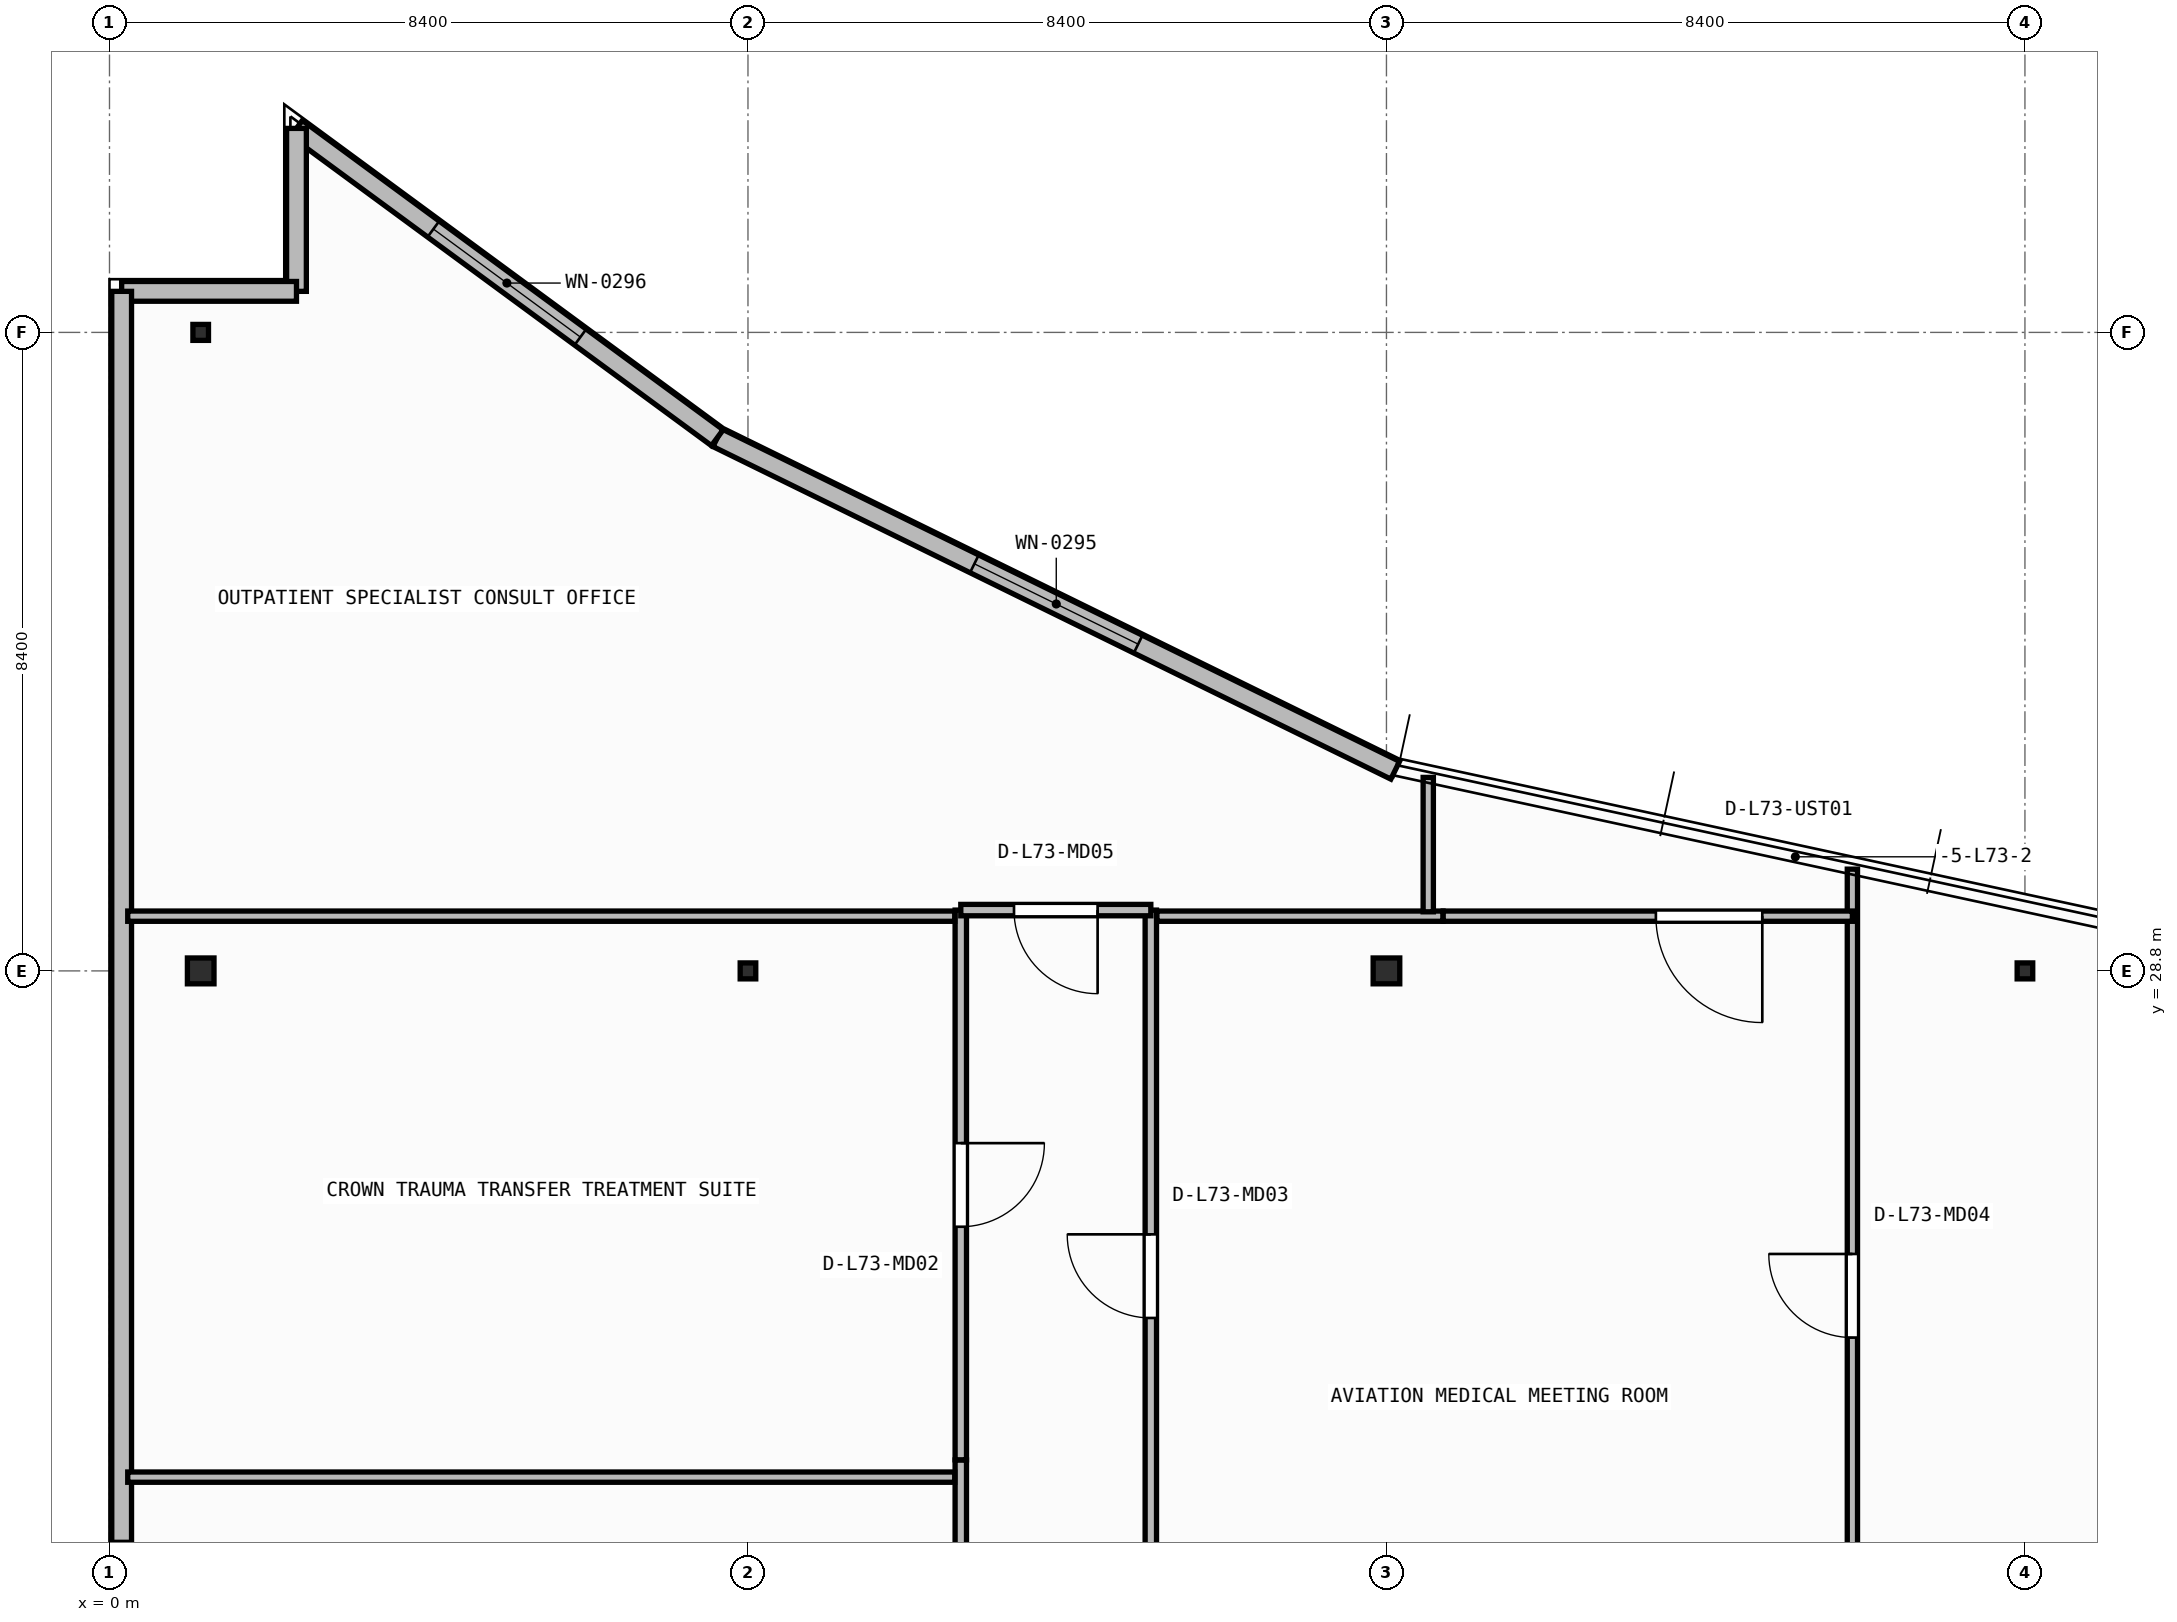
"""IFC4 building model, lengths in metres.
Left out: names, types, materials, properties, quantities, classifications, styles, units other than length and angle.
Written with IfcOpenShell. Run it as: python <this file> out.ifc"""

import sys

from ifc_helpers import new_model, si_unit, direction, frame, frame_2d, origin, origin_2d, place, context, subcontext, project, spatial, rectangle, i_section, extrude, element, fill, save


model = new_model("IFC4")
c1 = context("Model", 3, precision=1e-05, world=origin(), true_north=direction((0.0, 1.0)))
c2 = subcontext(c1, "Body", "Model", "MODEL_VIEW")
j1 = project(units=[si_unit("LENGTHUNIT", "METRE"), si_unit("PLANEANGLEUNIT", "RADIAN")], contexts=[c1])
p1 = place(None, origin())
s1 = spatial("IfcSite", under=j1, at=p1, CompositionType="ELEMENT")
p2 = place(p1, origin())
s2 = spatial("IfcBuilding", under=s1, at=p2, CompositionType="ELEMENT")
p3 = place(p2, frame((0.0, 0.0, 296.05)))
s3 = spatial("IfcBuildingStorey", under=s2, at=p3, CompositionType="ELEMENT", Elevation=296.05)
p4 = place(p3, frame((1.2, 28.8, 0.0), z_axis=(0.0, 0.0, 1.0), x_axis=(1.0, 0.0, 0.0)))
e1 = element("IfcColumn", 1, at=p4, inside=s3, PredefinedType="COLUMN", context=c2, shape_type="SweptSolid", body=[
    extrude(i_section(OverallWidth=0.35, OverallDepth=0.34, WebThickness=0.016, FlangeThickness=0.028, at=origin_2d()), origin(), (0.0, 0.0, 1.0), 3.95),
])
p5 = place(p3, frame((8.4, 28.8, 0.0), z_axis=(0.0, 0.0, 1.0), x_axis=(1.0, 0.0, 0.0)))
e2 = element("IfcColumn", 2, at=p5, inside=s3, PredefinedType="COLUMN", context=c2, shape_type="SweptSolid", body=[
    extrude(i_section(OverallWidth=0.205, OverallDepth=0.21, WebThickness=0.009, FlangeThickness=0.014, FilletRadius=0.011, at=origin_2d()), origin(), (0.0, 0.0, 1.0), 3.95),
])
p6 = place(p3, frame((16.8, 28.8, 0.0), z_axis=(0.0, 0.0, 1.0), x_axis=(1.0, 0.0, 0.0)))
e3 = element("IfcColumn", 3, at=p6, inside=s3, PredefinedType="COLUMN", context=c2, shape_type="SweptSolid", body=[
    extrude(i_section(OverallWidth=0.35, OverallDepth=0.34, WebThickness=0.016, FlangeThickness=0.028, at=origin_2d()), origin(), (0.0, 0.0, 1.0), 3.95),
])
for number, where, z_axis, x_axis in (
    (4, (25.2, 28.8, 0.0), (0.0, 0.0, 1.0), (1.0, 0.0, 0.0)),
    (5, (1.2, 37.2, 0.0), (0.0, 0.0, 1.0), (1.0, 0.0, 0.0)),
):
    element("IfcColumn", number, at=place(p3, frame(where, z_axis=z_axis, x_axis=x_axis)), inside=s3, PredefinedType="COLUMN", context=c2, shape_type="SweptSolid", body=[
        extrude(i_section(OverallWidth=0.205, OverallDepth=0.21, WebThickness=0.009, FlangeThickness=0.014, FilletRadius=0.011, at=origin_2d()), origin(), (0.0, 0.0, 1.0), 3.95),
    ])
p7 = place(p3, frame((16.915, 31.44, 0.0), z_axis=(0.0, 0.0, 1.0), x_axis=(-0.897793077248, 0.440417518322, 0.0)))
e6 = element("IfcWall", 6, at=p7, inside=s3, PredefinedType="STANDARD", context=c2, shape_type="SweptSolid", body=[
    extrude(rectangle(XDim=9.934, YDim=0.26, at=frame_2d((4.967, 0.0))), origin(), (0.0, 0.0, 1.0), 3.71),
])
p8 = place(p7, frame((3.767, 0.0, 0.9)))
e7 = element("IfcOpeningElement", 7, at=p8, cuts=e6, PredefinedType="OPENING", context=c2, shape_type="SweptSolid", body=[
    extrude(rectangle(XDim=2.4, YDim=1.65, at=frame_2d((1.2, 0.825))), frame((0.0, 0.14, 0.0), z_axis=(0.0, -1.0, 0.0), x_axis=(1.0, 0.0, 0.0)), (0.0, 0.0, 1.0), 0.28),
])
p9 = place(p3, frame((7.997, 35.815, 0.0), z_axis=(0.0, 0.0, 1.0), x_axis=(-0.805786654178, 0.592205933733, 0.0)))
e8 = element("IfcWall", 8, at=p9, inside=s3, PredefinedType="STANDARD", context=c2, shape_type="SweptSolid", body=[
    extrude(rectangle(XDim=6.871, YDim=0.26, at=frame_2d((3.436, 0.0))), origin(), (0.0, 0.0, 1.0), 3.71),
])
p10 = place(p9, frame((2.236, 0.0, 0.9)))
e9 = element("IfcOpeningElement", 9, at=p10, cuts=e8, PredefinedType="OPENING", context=c2, shape_type="SweptSolid", body=[
    extrude(rectangle(XDim=2.4, YDim=1.65, at=frame_2d((1.2, 0.825))), frame((0.0, 0.14, 0.0), z_axis=(0.0, -1.0, 0.0), x_axis=(1.0, 0.0, 0.0)), (0.0, 0.0, 1.0), 0.28),
])
p11 = place(p3, frame((2.46, 39.884, 0.0), z_axis=(0.0, 0.0, 1.0), x_axis=(0.0, -1.0, 0.0)))
e10 = element("IfcWall", 10, at=p11, inside=s3, PredefinedType="STANDARD", context=c2, shape_type="SweptSolid", body=[
    extrude(rectangle(XDim=2.144, YDim=0.26, at=frame_2d((1.072, 0.0))), origin(), (0.0, 0.0, 1.0), 3.71),
])
p12 = place(p3, frame((2.46, 37.74, 0.0), z_axis=(0.0, 0.0, 1.0), x_axis=(-1.0, 0.0, 0.0)))
e11 = element("IfcWall", 11, at=p12, inside=s3, PredefinedType="STANDARD", context=c2, shape_type="SweptSolid", body=[
    extrude(rectangle(XDim=2.3, YDim=0.26, at=frame_2d((1.15, 0.0))), origin(), (0.0, 0.0, 1.0), 3.71),
])
p13 = place(p3, frame((0.16, 37.74, 0.0), z_axis=(0.0, 0.0, 1.0), x_axis=(0.0, -1.0, 0.0)))
e12 = element("IfcWall", 12, at=p13, inside=s3, PredefinedType="STANDARD", context=c2, shape_type="SweptSolid", body=[
    extrude(rectangle(XDim=35.28, YDim=0.26, at=frame_2d((17.64, 0.0))), origin(), (0.0, 0.0, 1.0), 3.71),
])
p14 = place(p13, frame((16.44, 0.0, 0.9)))
e13 = element("IfcOpeningElement", 13, at=p14, cuts=e12, PredefinedType="OPENING", context=c2, shape_type="SweptSolid", body=[
    extrude(rectangle(XDim=2.4, YDim=1.65, at=frame_2d((1.2, 0.825))), frame((0.0, 0.14, 0.0), z_axis=(0.0, -1.0, 0.0), x_axis=(1.0, 0.0, 0.0)), (0.0, 0.0, 1.0), 0.28),
])
p15 = place(p3, frame((11.2, 22.366, 0.0), z_axis=(0.0, 0.0, 1.0), x_axis=(0.0, -1.0, 0.0)))
e14 = element("IfcWall", 14, at=p15, inside=s3, PredefinedType="PARTITIONING", context=c2, shape_type="SweptSolid", body=[
    extrude(rectangle(XDim=7.666, YDim=0.15, at=frame_2d((3.833, 0.0))), origin(), (0.0, 0.0, 1.0), 3.71),
])
p16 = place(p3, frame((11.2, 29.6, 0.0), z_axis=(0.0, 0.0, 1.0), x_axis=(0.0, -1.0, 0.0)))
e15 = element("IfcWall", 15, at=p16, inside=s3, PredefinedType="PARTITIONING", context=c2, shape_type="SweptSolid", body=[
    extrude(rectangle(XDim=7.232, YDim=0.15, at=frame_2d((3.616, 0.0))), origin(), (0.0, 0.0, 1.0), 3.71),
])
p17 = place(p16, frame((3.066, 0.0, 0.0)))
e16 = element("IfcOpeningElement", 16, at=p17, cuts=e15, PredefinedType="OPENING", context=c2, shape_type="SweptSolid", body=[
    extrude(rectangle(XDim=1.1, YDim=2.1, at=frame_2d((0.55, 1.05))), frame((0.0, 0.085, 0.0), z_axis=(0.0, -1.0, 0.0), x_axis=(1.0, 0.0, 0.0)), (0.0, 0.0, 1.0), 0.17),
])
p18 = place(p3, frame((13.7, 19.968, 0.0), z_axis=(0.0, 0.0, 1.0), x_axis=(0.0, 1.0, 0.0)))
e17 = element("IfcWall", 17, at=p18, inside=s3, PredefinedType="PARTITIONING", context=c2, shape_type="SweptSolid", body=[
    extrude(rectangle(XDim=9.632, YDim=0.15, at=frame_2d((4.816, 0.0))), origin(), (0.0, 0.0, 1.0), 3.71),
])
p19 = place(p18, frame((4.266, 0.0, 0.0)))
e18 = element("IfcOpeningElement", 18, at=p19, cuts=e17, PredefinedType="OPENING", context=c2, shape_type="SweptSolid", body=[
    extrude(rectangle(XDim=1.1, YDim=2.1, at=frame_2d((0.55, 1.05))), frame((0.0, 0.085, 0.0), z_axis=(0.0, -1.0, 0.0), x_axis=(1.0, 0.0, 0.0)), (0.0, 0.0, 1.0), 0.17),
])
p20 = place(p3, frame((13.7, 29.6, 0.0), z_axis=(0.0, 0.0, 1.0), x_axis=(-1.0, 0.0, 0.0)))
e19 = element("IfcWall", 19, at=p20, inside=s3, PredefinedType="PARTITIONING", context=c2, shape_type="SweptSolid", body=[
    extrude(rectangle(XDim=2.5, YDim=0.15, at=frame_2d((1.25, 0.0))), origin(), (0.0, 0.0, 1.0), 3.71),
])
p21 = place(p20, frame((0.7, 0.0, 0.0)))
e20 = element("IfcOpeningElement", 20, at=p21, cuts=e19, PredefinedType="OPENING", context=c2, shape_type="SweptSolid", body=[
    extrude(rectangle(XDim=1.1, YDim=2.1, at=frame_2d((0.55, 1.05))), frame((0.0, 0.085, 0.0), z_axis=(0.0, -1.0, 0.0), x_axis=(1.0, 0.0, 0.0)), (0.0, 0.0, 1.0), 0.17),
])
for number, where, z_axis, x_axis in (
    (21, (11.12, 22.14, 0.0), (0.0, 0.0, 1.0), (-1.0, 0.0, 0.0)),
    (22, (11.12, 29.52, 0.0), (0.0, 0.0, 1.0), (-1.0, 0.0, 0.0)),
):
    element("IfcWall", number, at=place(p3, frame(where, z_axis=z_axis, x_axis=x_axis)), inside=s3, PredefinedType="PARTITIONING", context=c2, shape_type="SweptSolid", body=[
        extrude(rectangle(XDim=10.88, YDim=0.135, at=frame_2d((5.44, 0.0))), origin(), (0.0, 0.0, 1.0), 3.71),
    ])
p22 = place(p3, frame((22.93, 19.798, 0.0), z_axis=(0.0, 0.0, 1.0), x_axis=(0.0, 1.0, 0.0)))
e23 = element("IfcWall", 23, at=p22, inside=s3, PredefinedType="PARTITIONING", context=c2, shape_type="SweptSolid", body=[
    extrude(rectangle(XDim=10.341, YDim=0.135, at=frame_2d((5.17, 0.0))), origin(), (0.0, 0.0, 1.0), 3.71),
])
p23 = place(p22, frame((4.178, 0.0, 0.0)))
e24 = element("IfcOpeningElement", 24, at=p23, cuts=e23, PredefinedType="OPENING", context=c2, shape_type="SweptSolid", body=[
    extrude(rectangle(XDim=1.1, YDim=2.1, at=frame_2d((0.55, 1.05))), frame((0.0, 0.077, 0.0), z_axis=(0.0, -1.0, 0.0), x_axis=(1.0, 0.0, 0.0)), (0.0, 0.0, 1.0), 0.155),
])
p24 = place(p3, frame((17.545, 29.52, 0.0), z_axis=(0.0, 0.0, 1.0), x_axis=(-1.0, 0.0, 0.0)))
e25 = element("IfcWall", 25, at=p24, inside=s3, PredefinedType="PARTITIONING", context=c2, shape_type="SweptSolid", body=[
    extrude(rectangle(XDim=3.765, YDim=0.135, at=frame_2d((1.882, 0.0))), origin(), (0.0, 0.0, 1.0), 3.71),
])
p25 = place(p3, frame((22.93, 29.52, 0.0), z_axis=(0.0, 0.0, 1.0), x_axis=(-1.0, 0.0, 0.0)))
e26 = element("IfcWall", 26, at=p25, inside=s3, PredefinedType="PARTITIONING", context=c2, shape_type="SweptSolid", body=[
    extrude(rectangle(XDim=5.383, YDim=0.135, at=frame_2d((2.692, 0.0))), origin(), (0.0, 0.0, 1.0), 3.71),
])
p26 = place(p25, frame((1.185, 0.0, 0.0)))
e27 = element("IfcOpeningElement", 27, at=p26, cuts=e26, PredefinedType="OPENING", context=c2, shape_type="SweptSolid", body=[
    extrude(rectangle(XDim=1.4, YDim=2.15, at=frame_2d((0.7, 1.075))), frame((0.0, 0.077, 0.0), z_axis=(0.0, -1.0, 0.0), x_axis=(1.0, 0.0, 0.0)), (0.0, 0.0, 1.0), 0.155),
])
p27 = place(p3, frame((17.35, 29.577, 0.0), z_axis=(0.0, 0.0, 1.0), x_axis=(0.0, 1.0, 0.0)))
e28 = element("IfcWall", 28, at=p27, inside=s3, PredefinedType="PARTITIONING", context=c2, shape_type="SweptSolid", body=[
    extrude(rectangle(XDim=1.768, YDim=0.135, at=frame_2d((0.884, 0.0))), origin(), (0.0, 0.0, 1.0), 3.71),
])
p28 = place(p8, origin())
e29 = element("IfcWindow", 29, at=p28, inside=s3, PartitioningType="SINGLE_PANEL", PredefinedType="WINDOW", context=c2, shape_type="SweptSolid", body=[
    extrude(rectangle(XDim=2.4, YDim=1.65, at=frame_2d((1.2, 0.825))), frame((0.0, 0.03, 0.0), z_axis=(0.0, -1.0, 0.0), x_axis=(1.0, 0.0, 0.0)), (0.0, 0.0, 1.0), 0.06),
])
fill(e7, e29)
p29 = place(p10, origin())
e30 = element("IfcWindow", 30, at=p29, inside=s3, PartitioningType="SINGLE_PANEL", PredefinedType="WINDOW", context=c2, shape_type="SweptSolid", body=[
    extrude(rectangle(XDim=2.4, YDim=1.65, at=frame_2d((1.2, 0.825))), frame((0.0, 0.03, 0.0), z_axis=(0.0, -1.0, 0.0), x_axis=(1.0, 0.0, 0.0)), (0.0, 0.0, 1.0), 0.06),
])
fill(e9, e30)
p30 = place(p14, origin())
e31 = element("IfcWindow", 31, at=p30, inside=s3, PartitioningType="SINGLE_PANEL", PredefinedType="WINDOW", context=c2, shape_type="SweptSolid", body=[
    extrude(rectangle(XDim=2.4, YDim=1.65, at=frame_2d((1.2, 0.825))), frame((0.0, 0.03, 0.0), z_axis=(0.0, -1.0, 0.0), x_axis=(1.0, 0.0, 0.0)), (0.0, 0.0, 1.0), 0.06),
])
fill(e13, e31)
p31 = place(p17, origin())
e32 = element("IfcDoor", 32, at=p31, inside=s3, OperationType="SINGLE_SWING_LEFT", PredefinedType="DOOR", context=c2, shape_type="SweptSolid", body=[
    extrude(rectangle(XDim=1.1, YDim=2.1, at=frame_2d((0.55, 1.05))), frame((0.0, 0.025, 0.0), z_axis=(0.0, -1.0, 0.0), x_axis=(1.0, 0.0, 0.0)), (0.0, 0.0, 1.0), 0.05),
])
fill(e16, e32)
p32 = place(p19, origin())
e33 = element("IfcDoor", 33, at=p32, inside=s3, OperationType="SINGLE_SWING_RIGHT", PredefinedType="DOOR", context=c2, shape_type="SweptSolid", body=[
    extrude(rectangle(XDim=1.1, YDim=2.1, at=frame_2d((0.55, 1.05))), frame((0.0, 0.025, 0.0), z_axis=(0.0, -1.0, 0.0), x_axis=(1.0, 0.0, 0.0)), (0.0, 0.0, 1.0), 0.05),
])
fill(e18, e33)
p33 = place(p21, origin())
e34 = element("IfcDoor", 34, at=p33, inside=s3, OperationType="SINGLE_SWING_LEFT", PredefinedType="DOOR", context=c2, shape_type="SweptSolid", body=[
    extrude(rectangle(XDim=1.1, YDim=2.1, at=frame_2d((0.55, 1.05))), frame((0.0, 0.025, 0.0), z_axis=(0.0, -1.0, 0.0), x_axis=(1.0, 0.0, 0.0)), (0.0, 0.0, 1.0), 0.05),
])
fill(e20, e34)
p34 = place(p23, origin())
e35 = element("IfcDoor", 35, at=p34, inside=s3, OperationType="SINGLE_SWING_RIGHT", PredefinedType="DOOR", context=c2, shape_type="SweptSolid", body=[
    extrude(rectangle(XDim=1.1, YDim=2.1, at=frame_2d((0.55, 1.05))), frame((0.0, 0.025, 0.0), z_axis=(0.0, -1.0, 0.0), x_axis=(1.0, 0.0, 0.0)), (0.0, 0.0, 1.0), 0.05),
])
fill(e24, e35)
p35 = place(p26, origin())
e36 = element("IfcDoor", 36, at=p35, inside=s3, OperationType="SINGLE_SWING_LEFT", PredefinedType="DOOR", context=c2, shape_type="SweptSolid", body=[
    extrude(rectangle(XDim=1.4, YDim=2.15, at=frame_2d((0.7, 1.075))), frame((0.0, 0.025, 0.0), z_axis=(0.0, -1.0, 0.0), x_axis=(1.0, 0.0, 0.0)), (0.0, 0.0, 1.0), 0.05),
])
fill(e27, e36)
save(model, sys.argv[1])
